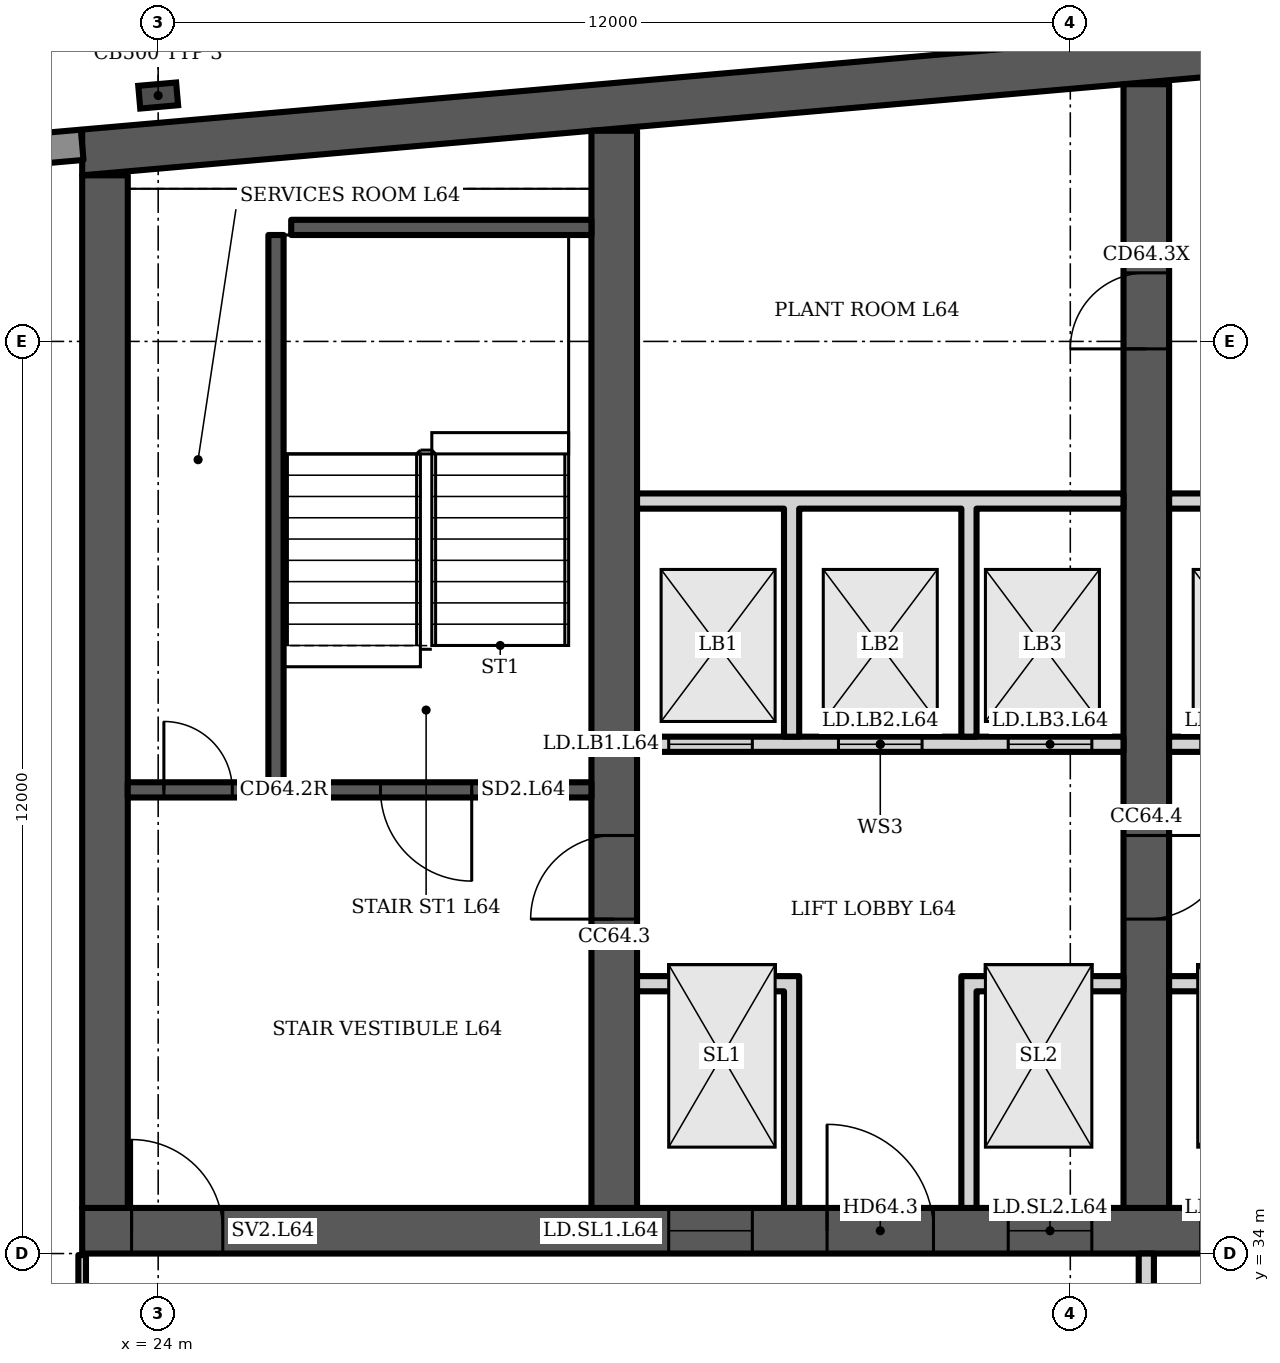
"""IFC4 building model, lengths in metres.
Left out: names, types, materials, properties, quantities, classifications, styles, units other than length and angle.
Written with IfcOpenShell. Run it as: python <this file> out.ifc"""

import sys

from ifc_helpers import new_model, si_unit, direction, frame, frame_2d, origin, origin_2d, place, context, subcontext, project, spatial, polyline, rectangle, i_section, outline, extrude, element, fill, save


model = new_model("IFC4")
c1 = context("Model", 3, precision=1e-05, world=origin(), true_north=direction((0.0, 1.0)))
c2 = subcontext(c1, "Body", "Model", "MODEL_VIEW")
j1 = project(units=[si_unit("LENGTHUNIT", "METRE"), si_unit("PLANEANGLEUNIT", "RADIAN")], contexts=[c1])
p1 = place(None, origin())
s1 = spatial("IfcSite", under=j1, at=p1, CompositionType="ELEMENT")
p2 = place(p1, origin())
s2 = spatial("IfcBuilding", under=s1, at=p2, CompositionType="ELEMENT")
p3 = place(p2, frame((0.0, 0.0, 253.9)))
s3 = spatial("IfcBuildingStorey", under=s2, at=p3, CompositionType="ELEMENT", Elevation=253.9)
p4 = place(p3, origin())
e1 = element("IfcWall", 1, at=p4, inside=s3, PredefinedType="SHEAR", context=c2, shape_type="SweptSolid", body=[
    extrude(outline(polyline([(23.0, 48.185), (40.5, 49.716), (58.0, 48.185), (58.0, 48.787), (40.5, 50.318), (23.0, 48.787), (23.0, 48.185)])), origin(), (0.0, 0.0, 1.0), 3.6),
])
p5 = place(p3, frame((23.0, 34.3, 0.0), z_axis=(0.0, 0.0, 1.0), x_axis=(1.0, 0.0, 0.0)))
e2 = element("IfcWall", 2, at=p5, inside=s3, PredefinedType="SHEAR", context=c2, shape_type="SweptSolid", body=[
    extrude(rectangle(XDim=35.0, YDim=0.6, at=frame_2d((17.5, 0.0))), origin(), (0.0, 0.0, 1.0), 3.6),
])
p6 = place(p5, frame((0.65, 0.0, 0.0)))
e3 = element("IfcOpeningElement", 3, at=p6, cuts=e2, PredefinedType="OPENING", context=c2, shape_type="SweptSolid", body=[
    extrude(rectangle(XDim=1.2, YDim=2.1, at=frame_2d((0.6, 1.05))), frame((0.0, 0.31, 0.0), z_axis=(0.0, -1.0, 0.0), x_axis=(1.0, 0.0, 0.0)), (0.0, 0.0, 1.0), 0.62),
])
p7 = place(p5, frame((7.717, 0.0, 0.0)))
e4 = element("IfcOpeningElement", 4, at=p7, cuts=e2, PredefinedType="OPENING", context=c2, shape_type="SweptSolid", body=[
    extrude(rectangle(XDim=1.1, YDim=2.1, at=frame_2d((0.55, 1.05))), frame((0.0, 0.31, 0.0), z_axis=(0.0, -1.0, 0.0), x_axis=(1.0, 0.0, 0.0)), (0.0, 0.0, 1.0), 0.62),
])
p8 = place(p5, frame((12.183, 0.0, 0.0)))
e5 = element("IfcOpeningElement", 5, at=p8, cuts=e2, PredefinedType="OPENING", context=c2, shape_type="SweptSolid", body=[
    extrude(rectangle(XDim=1.1, YDim=2.1, at=frame_2d((0.55, 1.05))), frame((0.0, 0.31, 0.0), z_axis=(0.0, -1.0, 0.0), x_axis=(1.0, 0.0, 0.0)), (0.0, 0.0, 1.0), 0.62),
])
p9 = place(p5, frame((9.8, 0.0, 0.0)))
e6 = element("IfcOpeningElement", 6, at=p9, cuts=e2, PredefinedType="OPENING", context=c2, shape_type="SweptSolid", body=[
    extrude(rectangle(XDim=1.4, YDim=2.1, at=frame_2d((0.7, 1.05))), frame((0.0, 0.31, 0.0), z_axis=(0.0, -1.0, 0.0), x_axis=(1.0, 0.0, 0.0)), (0.0, 0.0, 1.0), 0.62),
])
p10 = place(p5, frame((14.717, 0.0, 0.0)))
e7 = element("IfcOpeningElement", 7, at=p10, cuts=e2, PredefinedType="OPENING", context=c2, shape_type="SweptSolid", body=[
    extrude(rectangle(XDim=1.1, YDim=2.1, at=frame_2d((0.55, 1.05))), frame((0.0, 0.31, 0.0), z_axis=(0.0, -1.0, 0.0), x_axis=(1.0, 0.0, 0.0)), (0.0, 0.0, 1.0), 0.62),
])
p11 = place(p5, frame((16.95, 0.0, 0.0)))
e8 = element("IfcOpeningElement", 8, at=p11, cuts=e2, PredefinedType="OPENING", context=c2, shape_type="SweptSolid", body=[
    extrude(rectangle(XDim=1.1, YDim=2.1, at=frame_2d((0.55, 1.05))), frame((0.0, 0.31, 0.0), z_axis=(0.0, -1.0, 0.0), x_axis=(1.0, 0.0, 0.0)), (0.0, 0.0, 1.0), 0.62),
])
p12 = place(p5, frame((19.183, 0.0, 0.0)))
e9 = element("IfcOpeningElement", 9, at=p12, cuts=e2, PredefinedType="OPENING", context=c2, shape_type="SweptSolid", body=[
    extrude(rectangle(XDim=1.1, YDim=2.1, at=frame_2d((0.55, 1.05))), frame((0.0, 0.31, 0.0), z_axis=(0.0, -1.0, 0.0), x_axis=(1.0, 0.0, 0.0)), (0.0, 0.0, 1.0), 0.62),
])
p13 = place(p5, frame((26.15, 0.0, 0.0)))
e10 = element("IfcOpeningElement", 10, at=p13, cuts=e2, PredefinedType="OPENING", context=c2, shape_type="SweptSolid", body=[
    extrude(rectangle(XDim=1.2, YDim=2.1, at=frame_2d((0.6, 1.05))), frame((0.0, 0.31, 0.0), z_axis=(0.0, -1.0, 0.0), x_axis=(1.0, 0.0, 0.0)), (0.0, 0.0, 1.0), 0.62),
])
p14 = place(p5, frame((28.767, 0.0, 0.0)))
e11 = element("IfcOpeningElement", 11, at=p14, cuts=e2, PredefinedType="OPENING", context=c2, shape_type="SweptSolid", body=[
    extrude(rectangle(XDim=1.0, YDim=2.1, at=frame_2d((0.5, 1.05))), frame((0.0, 0.31, 0.0), z_axis=(0.0, -1.0, 0.0), x_axis=(1.0, 0.0, 0.0)), (0.0, 0.0, 1.0), 0.62),
])
p15 = place(p5, frame((33.083, 0.0, 0.0)))
e12 = element("IfcOpeningElement", 12, at=p15, cuts=e2, PredefinedType="OPENING", context=c2, shape_type="SweptSolid", body=[
    extrude(rectangle(XDim=1.0, YDim=2.1, at=frame_2d((0.5, 1.05))), frame((0.0, 0.31, 0.0), z_axis=(0.0, -1.0, 0.0), x_axis=(1.0, 0.0, 0.0)), (0.0, 0.0, 1.0), 0.62),
])
p16 = place(p5, frame((30.8, 0.0, 0.0)))
e13 = element("IfcOpeningElement", 13, at=p16, cuts=e2, PredefinedType="OPENING", context=c2, shape_type="SweptSolid", body=[
    extrude(rectangle(XDim=1.4, YDim=2.1, at=frame_2d((0.7, 1.05))), frame((0.0, 0.31, 0.0), z_axis=(0.0, -1.0, 0.0), x_axis=(1.0, 0.0, 0.0)), (0.0, 0.0, 1.0), 0.62),
])
p17 = place(p3, frame((23.3, 34.6, 0.0), z_axis=(0.0, 0.0, 1.0), x_axis=(0.0, 1.0, 0.0)))
e14 = element("IfcWall", 14, at=p17, inside=s3, PredefinedType="SHEAR", context=c2, shape_type="SweptSolid", body=[
    extrude(rectangle(XDim=13.585, YDim=0.6, at=frame_2d((6.792, 0.0))), origin(), (0.0, 0.0, 1.0), 3.6),
])
p18 = place(p3, frame((30.0, 34.6, 0.0), z_axis=(0.0, 0.0, 1.0), x_axis=(0.0, 1.0, 0.0)))
e15 = element("IfcWall", 15, at=p18, inside=s3, PredefinedType="SHEAR", context=c2, shape_type="SweptSolid", body=[
    extrude(rectangle(XDim=14.171, YDim=0.6, at=frame_2d((7.085, 0.0))), origin(), (0.0, 0.0, 1.0), 3.6),
])
p19 = place(p18, frame((3.8, 0.0, 0.0)))
e16 = element("IfcOpeningElement", 16, at=p19, cuts=e15, PredefinedType="OPENING", context=c2, shape_type="SweptSolid", body=[
    extrude(rectangle(XDim=1.1, YDim=2.1, at=frame_2d((0.55, 1.05))), frame((0.0, 0.31, 0.0), z_axis=(0.0, -1.0, 0.0), x_axis=(1.0, 0.0, 0.0)), (0.0, 0.0, 1.0), 0.62),
])
p20 = place(p3, frame((37.0, 34.6, 0.0), z_axis=(0.0, 0.0, 1.0), x_axis=(0.0, 1.0, 0.0)))
e17 = element("IfcWall", 17, at=p20, inside=s3, PredefinedType="SHEAR", context=c2, shape_type="SweptSolid", body=[
    extrude(rectangle(XDim=14.784, YDim=0.6, at=frame_2d((7.392, 0.0))), origin(), (0.0, 0.0, 1.0), 3.6),
])
p21 = place(p20, frame((11.302, 0.0, 0.0)))
e18 = element("IfcOpeningElement", 18, at=p21, cuts=e17, PredefinedType="OPENING", context=c2, shape_type="SweptSolid", body=[
    extrude(rectangle(XDim=1.0, YDim=2.1, at=frame_2d((0.5, 1.05))), frame((0.0, 0.31, 0.0), z_axis=(0.0, -1.0, 0.0), x_axis=(1.0, 0.0, 0.0)), (0.0, 0.0, 1.0), 0.62),
])
p22 = place(p20, frame((3.8, 0.0, 0.0)))
e19 = element("IfcOpeningElement", 19, at=p22, cuts=e17, PredefinedType="OPENING", context=c2, shape_type="SweptSolid", body=[
    extrude(rectangle(XDim=1.1, YDim=2.1, at=frame_2d((0.55, 1.05))), frame((0.0, 0.31, 0.0), z_axis=(0.0, -1.0, 0.0), x_axis=(1.0, 0.0, 0.0)), (0.0, 0.0, 1.0), 0.62),
])
p23 = place(p3, frame((24.0, 49.235, 0.0), z_axis=(0.0, 0.0, 1.0), x_axis=(-0.087156, 0.996197, 0.0)))
e20 = element("IfcColumn", 20, at=p23, inside=s3, PredefinedType="COLUMN", context=c2, shape_type="SweptSolid", body=[
    extrude(i_section(OverallWidth=0.3, OverallDepth=0.5, WebThickness=0.014, FlangeThickness=0.028, FilletRadius=0.027, at=origin_2d()), origin(), (0.0, 0.0, 1.0), 3.6),
])
p24 = place(p3, frame((23.0, 48.587, 0.0), z_axis=(0.0, 0.0, 1.0), x_axis=(-0.996194, -0.087168, 0.0)))
e21 = element("IfcWall", 21, at=p24, inside=s3, PredefinedType="SOLIDWALL", context=c2, shape_type="SweptSolid", body=[
    extrude(rectangle(XDim=2.994, YDim=0.4, at=frame_2d((1.497, 0.0))), origin(), (0.0, 0.0, 1.0), 3.2),
])
p25 = place(p3, frame((23.6, 40.1, 0.0), z_axis=(0.0, 0.0, 1.0), x_axis=(1.0, 0.0, 0.0)))
e22 = element("IfcWall", 22, at=p25, inside=s3, PredefinedType="SHEAR", context=c2, shape_type="SweptSolid", body=[
    extrude(rectangle(XDim=6.1, YDim=0.2, at=frame_2d((3.05, 0.0))), origin(), (0.0, 0.0, 1.0), 3.2),
])
p26 = place(p25, frame((3.325, 0.0, 0.0)))
e23 = element("IfcOpeningElement", 23, at=p26, cuts=e22, PredefinedType="OPENING", context=c2, shape_type="SweptSolid", body=[
    extrude(rectangle(XDim=1.2, YDim=2.1, at=frame_2d((0.6, 1.05))), frame((0.0, 0.11, 0.0), z_axis=(0.0, -1.0, 0.0), x_axis=(1.0, 0.0, 0.0)), (0.0, 0.0, 1.0), 0.22),
])
p27 = place(p25, frame((0.475, 0.0, 0.0)))
e24 = element("IfcOpeningElement", 24, at=p27, cuts=e22, PredefinedType="OPENING", context=c2, shape_type="SweptSolid", body=[
    extrude(rectangle(XDim=0.9, YDim=2.1, at=frame_2d((0.45, 1.05))), frame((0.0, 0.11, 0.0), z_axis=(0.0, -1.0, 0.0), x_axis=(1.0, 0.0, 0.0)), (0.0, 0.0, 1.0), 0.22),
])
p28 = place(p3, frame((25.55, 40.2, 0.0), z_axis=(0.0, 0.0, 1.0), x_axis=(0.0, 1.0, 0.0)))
e25 = element("IfcWall", 25, at=p28, inside=s3, PredefinedType="SHEAR", context=c2, shape_type="SweptSolid", body=[
    extrude(rectangle(XDim=7.2, YDim=0.2, at=frame_2d((3.6, 0.0))), origin(), (0.0, 0.0, 1.0), 3.2),
])
p29 = place(p3, frame((25.75, 47.5, 0.0), z_axis=(0.0, 0.0, 1.0), x_axis=(1.0, 0.0, 0.0)))
e26 = element("IfcWall", 26, at=p29, inside=s3, PredefinedType="SHEAR", context=c2, shape_type="SweptSolid", body=[
    extrude(rectangle(XDim=3.95, YDim=0.2, at=frame_2d((1.975, 0.0))), origin(), (0.0, 0.0, 1.0), 3.2),
])
p30 = place(p3, frame((30.3, 40.7, 0.0), z_axis=(0.0, 0.0, 1.0), x_axis=(1.0, 0.0, 0.0)))
e27 = element("IfcWall", 27, at=p30, inside=s3, PredefinedType="PARTITIONING", context=c2, shape_type="SweptSolid", body=[
    extrude(rectangle(XDim=6.4, YDim=0.2, at=frame_2d((3.2, 0.0))), origin(), (0.0, 0.0, 1.0), 3.2),
])
p31 = place(p30, frame((0.417, 0.0, 0.0)))
e28 = element("IfcOpeningElement", 28, at=p31, cuts=e27, PredefinedType="OPENING", context=c2, shape_type="SweptSolid", body=[
    extrude(rectangle(XDim=1.1, YDim=2.1, at=frame_2d((0.55, 1.05))), frame((0.0, 0.11, 0.0), z_axis=(0.0, -1.0, 0.0), x_axis=(1.0, 0.0, 0.0)), (0.0, 0.0, 1.0), 0.22),
])
p32 = place(p30, frame((2.65, 0.0, 0.0)))
e29 = element("IfcOpeningElement", 29, at=p32, cuts=e27, PredefinedType="OPENING", context=c2, shape_type="SweptSolid", body=[
    extrude(rectangle(XDim=1.1, YDim=2.1, at=frame_2d((0.55, 1.05))), frame((0.0, 0.11, 0.0), z_axis=(0.0, -1.0, 0.0), x_axis=(1.0, 0.0, 0.0)), (0.0, 0.0, 1.0), 0.22),
])
p33 = place(p30, frame((4.883, 0.0, 0.0)))
e30 = element("IfcOpeningElement", 30, at=p33, cuts=e27, PredefinedType="OPENING", context=c2, shape_type="SweptSolid", body=[
    extrude(rectangle(XDim=1.1, YDim=2.1, at=frame_2d((0.55, 1.05))), frame((0.0, 0.11, 0.0), z_axis=(0.0, -1.0, 0.0), x_axis=(1.0, 0.0, 0.0)), (0.0, 0.0, 1.0), 0.22),
])
p34 = place(p3, origin())
e31 = element("IfcWall", 31, at=p34, inside=s3, PredefinedType="PARTITIONING", context=c2, shape_type="SweptSolid", body=[
    extrude(outline(polyline([(32.233, 37.45), (30.3, 37.45), (30.3, 37.65), (32.233, 37.65), (32.433, 37.65), (32.433, 34.6), (32.233, 34.6), (32.233, 37.45)])), origin(), (0.0, 0.0, 1.0), 3.2),
])
p35 = place(p3, origin())
e32 = element("IfcWall", 32, at=p35, inside=s3, PredefinedType="PARTITIONING", context=c2, shape_type="SweptSolid", body=[
    extrude(outline(polyline([(34.567, 37.65), (34.767, 37.65), (36.7, 37.65), (36.7, 37.45), (34.767, 37.45), (34.767, 34.6), (34.567, 34.6), (34.567, 37.65)])), origin(), (0.0, 0.0, 1.0), 3.2),
])
p36 = place(p3, origin())
e33 = element("IfcWall", 33, at=p36, inside=s3, PredefinedType="PARTITIONING", context=c2, shape_type="SweptSolid", body=[
    extrude(outline(polyline([(32.433, 40.8), (32.233, 40.8), (32.233, 43.8), (30.3, 43.8), (30.3, 44.0), (36.7, 44.0), (36.7, 43.8), (34.767, 43.8), (34.767, 40.8), (34.567, 40.8), (34.567, 43.8), (32.433, 43.8), (32.433, 40.8)])), origin(), (0.0, 0.0, 1.0), 3.2),
])
p37 = place(p3, frame((37.3, 40.7, 0.0), z_axis=(0.0, 0.0, 1.0), x_axis=(1.0, 0.0, 0.0)))
e34 = element("IfcWall", 34, at=p37, inside=s3, PredefinedType="PARTITIONING", context=c2, shape_type="SweptSolid", body=[
    extrude(rectangle(XDim=6.4, YDim=0.2, at=frame_2d((3.2, 0.0))), origin(), (0.0, 0.0, 1.0), 3.2),
])
p38 = place(p37, frame((0.417, 0.0, 0.0)))
e35 = element("IfcOpeningElement", 35, at=p38, cuts=e34, PredefinedType="OPENING", context=c2, shape_type="SweptSolid", body=[
    extrude(rectangle(XDim=1.1, YDim=2.1, at=frame_2d((0.55, 1.05))), frame((0.0, 0.11, 0.0), z_axis=(0.0, -1.0, 0.0), x_axis=(1.0, 0.0, 0.0)), (0.0, 0.0, 1.0), 0.22),
])
p39 = place(p37, frame((2.65, 0.0, 0.0)))
e36 = element("IfcOpeningElement", 36, at=p39, cuts=e34, PredefinedType="OPENING", context=c2, shape_type="SweptSolid", body=[
    extrude(rectangle(XDim=1.1, YDim=2.1, at=frame_2d((0.55, 1.05))), frame((0.0, 0.11, 0.0), z_axis=(0.0, -1.0, 0.0), x_axis=(1.0, 0.0, 0.0)), (0.0, 0.0, 1.0), 0.22),
])
p40 = place(p37, frame((4.883, 0.0, 0.0)))
e37 = element("IfcOpeningElement", 37, at=p40, cuts=e34, PredefinedType="OPENING", context=c2, shape_type="SweptSolid", body=[
    extrude(rectangle(XDim=1.1, YDim=2.1, at=frame_2d((0.55, 1.05))), frame((0.0, 0.11, 0.0), z_axis=(0.0, -1.0, 0.0), x_axis=(1.0, 0.0, 0.0)), (0.0, 0.0, 1.0), 0.22),
])
p41 = place(p3, origin())
e38 = element("IfcWall", 38, at=p41, inside=s3, PredefinedType="PARTITIONING", context=c2, shape_type="SweptSolid", body=[
    extrude(outline(polyline([(41.567, 37.1), (39.433, 37.1), (39.433, 34.6), (39.233, 34.6), (39.233, 37.45), (37.3, 37.45), (37.3, 37.65), (39.233, 37.65), (39.433, 37.65), (39.433, 37.3), (41.567, 37.3), (41.567, 37.35), (41.767, 37.35), (43.7, 37.35), (43.7, 37.15), (41.767, 37.15), (41.767, 34.6), (41.567, 34.6), (41.567, 37.1)])), origin(), (0.0, 0.0, 1.0), 3.2),
])
p42 = place(p3, origin())
e39 = element("IfcWall", 39, at=p42, inside=s3, PredefinedType="PARTITIONING", context=c2, shape_type="SweptSolid", body=[
    extrude(outline(polyline([(39.433, 40.8), (39.233, 40.8), (39.233, 43.8), (37.3, 43.8), (37.3, 44.0), (43.7, 44.0), (43.7, 43.8), (41.767, 43.8), (41.767, 40.8), (41.567, 40.8), (41.567, 43.8), (39.433, 43.8), (39.433, 40.8)])), origin(), (0.0, 0.0, 1.0), 3.2),
])
p43 = place(p3, frame((37.0, 30.5, 0.0), z_axis=(0.0, 0.0, 1.0), x_axis=(0.0, 1.0, 0.0)))
e40 = element("IfcWall", 40, at=p43, inside=s3, PredefinedType="PARTITIONING", context=c2, shape_type="SweptSolid", body=[
    extrude(rectangle(XDim=3.5, YDim=0.2, at=frame_2d((1.75, 0.0))), origin(), (0.0, 0.0, 1.0), 3.2),
])
p44 = place(p43, frame((1.2, 0.0, 0.0)))
e41 = element("IfcOpeningElement", 41, at=p44, cuts=e40, PredefinedType="OPENING", context=c2, shape_type="SweptSolid", body=[
    extrude(rectangle(XDim=1.1, YDim=2.1, at=frame_2d((0.55, 1.05))), frame((0.0, 0.11, 0.0), z_axis=(0.0, -1.0, 0.0), x_axis=(1.0, 0.0, 0.0)), (0.0, 0.0, 1.0), 0.22),
])
p45 = place(p3, frame((23.0, 30.5, 0.0), z_axis=(0.0, 0.0, 1.0), x_axis=(0.0, 1.0, 0.0)))
e42 = element("IfcWall", 42, at=p45, inside=s3, PredefinedType="PARTITIONING", context=c2, shape_type="SweptSolid", body=[
    extrude(rectangle(XDim=3.48, YDim=0.1, at=frame_2d((1.74, 0.0))), origin(), (0.0, 0.0, 1.0), 3.2),
])
p46 = place(p26, origin())
e43 = element("IfcDoor", 43, at=p46, inside=s3, OperationType="SINGLE_SWING_RIGHT", PredefinedType="DOOR", context=c2, shape_type="SweptSolid", body=[
    extrude(rectangle(XDim=1.2, YDim=2.1, at=frame_2d((0.6, 1.05))), frame((0.0, 0.025, 0.0), z_axis=(0.0, -1.0, 0.0), x_axis=(1.0, 0.0, 0.0)), (0.0, 0.0, 1.0), 0.05),
])
fill(e23, e43)
p47 = place(p27, origin())
e44 = element("IfcDoor", 44, at=p47, inside=s3, OperationType="SINGLE_SWING_LEFT", PredefinedType="DOOR", context=c2, shape_type="SweptSolid", body=[
    extrude(rectangle(XDim=0.9, YDim=2.1, at=frame_2d((0.45, 1.05))), frame((0.0, 0.025, 0.0), z_axis=(0.0, -1.0, 0.0), x_axis=(1.0, 0.0, 0.0)), (0.0, 0.0, 1.0), 0.05),
])
fill(e24, e44)
p48 = place(p6, origin())
e45 = element("IfcDoor", 45, at=p48, inside=s3, OperationType="SINGLE_SWING_LEFT", PredefinedType="DOOR", context=c2, shape_type="SweptSolid", body=[
    extrude(rectangle(XDim=1.2, YDim=2.1, at=frame_2d((0.6, 1.05))), frame((0.0, 0.025, 0.0), z_axis=(0.0, -1.0, 0.0), x_axis=(1.0, 0.0, 0.0)), (0.0, 0.0, 1.0), 0.05),
])
fill(e3, e45)
p49 = place(p7, origin())
e46 = element("IfcDoor", 46, at=p49, inside=s3, OperationType="DOUBLE_DOOR_SLIDING", PredefinedType="DOOR", context=c2, shape_type="SweptSolid", body=[
    extrude(rectangle(XDim=1.1, YDim=2.1, at=frame_2d((0.55, 1.05))), frame((0.0, 0.025, 0.0), z_axis=(0.0, -1.0, 0.0), x_axis=(1.0, 0.0, 0.0)), (0.0, 0.0, 1.0), 0.05),
])
fill(e4, e46)
p50 = place(p8, origin())
e47 = element("IfcDoor", 47, at=p50, inside=s3, OperationType="DOUBLE_DOOR_SLIDING", PredefinedType="DOOR", context=c2, shape_type="SweptSolid", body=[
    extrude(rectangle(XDim=1.1, YDim=2.1, at=frame_2d((0.55, 1.05))), frame((0.0, 0.025, 0.0), z_axis=(0.0, -1.0, 0.0), x_axis=(1.0, 0.0, 0.0)), (0.0, 0.0, 1.0), 0.05),
])
fill(e5, e47)
p51 = place(p9, origin())
e48 = element("IfcDoor", 48, at=p51, inside=s3, OperationType="DOUBLE_DOOR_SINGLE_SWING", PredefinedType="DOOR", context=c2, shape_type="SweptSolid", body=[
    extrude(rectangle(XDim=1.4, YDim=2.1, at=frame_2d((0.7, 1.05))), frame((0.0, 0.025, 0.0), z_axis=(0.0, -1.0, 0.0), x_axis=(1.0, 0.0, 0.0)), (0.0, 0.0, 1.0), 0.05),
])
fill(e6, e48)
p52 = place(p31, origin())
e49 = element("IfcDoor", 49, at=p52, inside=s3, OperationType="DOUBLE_DOOR_SLIDING", PredefinedType="DOOR", context=c2, shape_type="SweptSolid", body=[
    extrude(rectangle(XDim=1.1, YDim=2.1, at=frame_2d((0.55, 1.05))), frame((0.0, 0.025, 0.0), z_axis=(0.0, -1.0, 0.0), x_axis=(1.0, 0.0, 0.0)), (0.0, 0.0, 1.0), 0.05),
])
fill(e28, e49)
p53 = place(p32, origin())
e50 = element("IfcDoor", 50, at=p53, inside=s3, OperationType="DOUBLE_DOOR_SLIDING", PredefinedType="DOOR", context=c2, shape_type="SweptSolid", body=[
    extrude(rectangle(XDim=1.1, YDim=2.1, at=frame_2d((0.55, 1.05))), frame((0.0, 0.025, 0.0), z_axis=(0.0, -1.0, 0.0), x_axis=(1.0, 0.0, 0.0)), (0.0, 0.0, 1.0), 0.05),
])
fill(e29, e50)
p54 = place(p33, origin())
e51 = element("IfcDoor", 51, at=p54, inside=s3, OperationType="DOUBLE_DOOR_SLIDING", PredefinedType="DOOR", context=c2, shape_type="SweptSolid", body=[
    extrude(rectangle(XDim=1.1, YDim=2.1, at=frame_2d((0.55, 1.05))), frame((0.0, 0.025, 0.0), z_axis=(0.0, -1.0, 0.0), x_axis=(1.0, 0.0, 0.0)), (0.0, 0.0, 1.0), 0.05),
])
fill(e30, e51)
p55 = place(p21, origin())
e52 = element("IfcDoor", 52, at=p55, inside=s3, OperationType="SINGLE_SWING_LEFT", PredefinedType="DOOR", context=c2, shape_type="SweptSolid", body=[
    extrude(rectangle(XDim=1.0, YDim=2.1, at=frame_2d((0.5, 1.05))), frame((0.0, 0.025, 0.0), z_axis=(0.0, -1.0, 0.0), x_axis=(1.0, 0.0, 0.0)), (0.0, 0.0, 1.0), 0.05),
])
fill(e18, e52)
p56 = place(p19, origin())
e53 = element("IfcDoor", 53, at=p56, inside=s3, OperationType="SINGLE_SWING_LEFT", PredefinedType="DOOR", context=c2, shape_type="SweptSolid", body=[
    extrude(rectangle(XDim=1.1, YDim=2.1, at=frame_2d((0.55, 1.05))), frame((0.0, 0.025, 0.0), z_axis=(0.0, -1.0, 0.0), x_axis=(1.0, 0.0, 0.0)), (0.0, 0.0, 1.0), 0.05),
])
fill(e16, e53)
p57 = place(p22, origin())
e54 = element("IfcDoor", 54, at=p57, inside=s3, OperationType="SINGLE_SWING_RIGHT", PredefinedType="DOOR", context=c2, shape_type="SweptSolid", body=[
    extrude(rectangle(XDim=1.1, YDim=2.1, at=frame_2d((0.55, 1.05))), frame((0.0, 0.025, 0.0), z_axis=(0.0, -1.0, 0.0), x_axis=(1.0, 0.0, 0.0)), (0.0, 0.0, 1.0), 0.05),
])
fill(e19, e54)
save(model, sys.argv[1])
